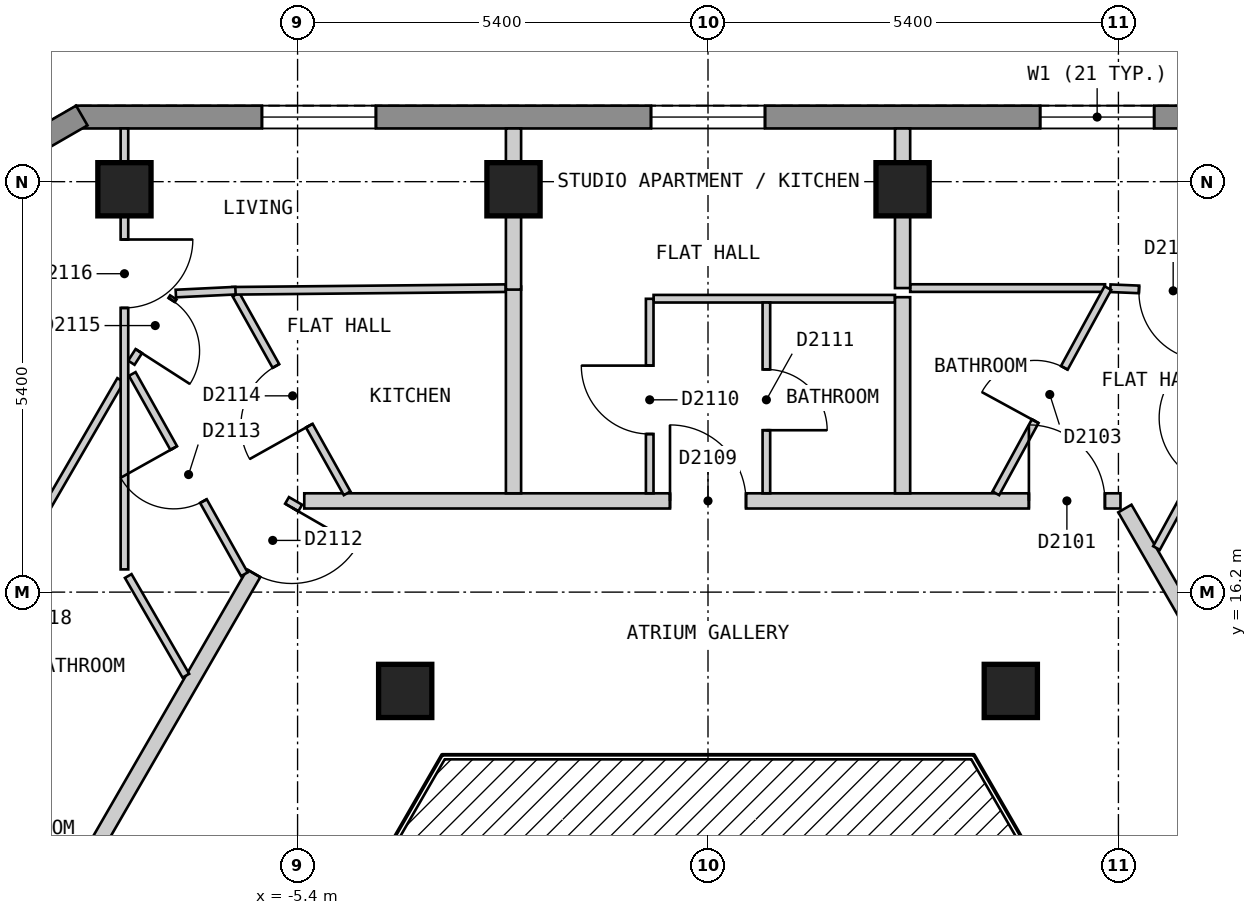
"""IFC4 building model, lengths in metres.
Left out: names, types, materials, properties, quantities, classifications, styles, units other than length and angle.
Written with IfcOpenShell. Run it as: python <this file> out.ifc"""

import sys

from ifc_helpers import new_model, si_unit, direction, frame, frame_2d, origin, origin_2d, place, context, subcontext, project, spatial, polyline, rectangle, outline, extrude, element, fill, save


model = new_model("IFC4")
c1 = context("Model", 3, precision=1e-05, world=origin(), true_north=direction((0.0, 1.0)))
c2 = subcontext(c1, "Body", "Model", "MODEL_VIEW")
j1 = project(units=[si_unit("LENGTHUNIT", "METRE"), si_unit("PLANEANGLEUNIT", "RADIAN")], contexts=[c1])
p1 = place(None, origin())
s1 = spatial("IfcSite", under=j1, at=p1, CompositionType="ELEMENT")
p2 = place(p1, origin())
s2 = spatial("IfcBuilding", under=s1, at=p2, CompositionType="ELEMENT")
p3 = place(p2, frame((0.0, 0.0, 211.8)))
s3 = spatial("IfcBuildingStorey", under=s2, at=p3, CompositionType="ELEMENT", Elevation=211.8)
for number, where, z_axis, x_axis in (
    (1, (2.56, 21.5, 0.0), (0.0, 0.0, 1.0), (-1.0, 0.0, 0.0)),
    (2, (-2.559, 21.5, 0.0), (0.0, 0.0, 1.0), (-1.0, 0.0, 0.0)),
    (3, (-7.678, 21.5, 0.0), (0.0, 0.0, 1.0), (-1.0, 0.0, 0.0)),
    (4, (3.984, 14.9, 0.0), (0.0, 0.0, 1.0), (1.0, 0.0, 0.0)),
    (5, (-3.984, 14.9, 0.0), (0.0, 0.0, 1.0), (1.0, 0.0, 0.0)),
):
    element("IfcColumn", number, at=place(p3, frame(where, z_axis=z_axis, x_axis=x_axis)), inside=s3, PredefinedType="COLUMN", context=c2, shape_type="SweptSolid", body=[
        extrude(rectangle(XDim=0.7, YDim=0.7, at=origin_2d()), origin(), (0.0, 0.0, 1.0), 3.0),
    ])
p4 = place(p3, frame((8.314, 22.45, 0.0), z_axis=(0.0, 0.0, 1.0), x_axis=(-1.0, 0.0, 0.0)))
e6 = element("IfcWall", 6, at=p4, inside=s3, PredefinedType="SOLIDWALL", context=c2, shape_type="SweptSolid", body=[
    extrude(outline(polyline([(0.0, -0.15), (16.628, -0.15), (16.548, 0.15), (0.08, 0.15), (0.0, -0.15)])), origin(), (0.0, 0.0, 1.0), 2.7),
])
p5 = place(p4, frame((2.444, 0.0, 0.15)))
e7 = element("IfcOpeningElement", 7, at=p5, cuts=e6, PredefinedType="OPENING", context=c2, shape_type="SweptSolid", body=[
    extrude(rectangle(XDim=1.5, YDim=2.1, at=frame_2d((0.75, 1.05))), frame((0.0, 0.16, 0.0), z_axis=(0.0, -1.0, 0.0), x_axis=(1.0, 0.0, 0.0)), (0.0, 0.0, 1.0), 0.32),
])
p6 = place(p4, frame((7.564, 0.0, 0.15)))
e8 = element("IfcOpeningElement", 8, at=p6, cuts=e6, PredefinedType="OPENING", context=c2, shape_type="SweptSolid", body=[
    extrude(rectangle(XDim=1.5, YDim=2.1, at=frame_2d((0.75, 1.05))), frame((0.0, 0.16, 0.0), z_axis=(0.0, -1.0, 0.0), x_axis=(1.0, 0.0, 0.0)), (0.0, 0.0, 1.0), 0.32),
])
p7 = place(p4, frame((12.683, 0.0, 0.15)))
e9 = element("IfcOpeningElement", 9, at=p7, cuts=e6, PredefinedType="OPENING", context=c2, shape_type="SweptSolid", body=[
    extrude(rectangle(XDim=1.5, YDim=2.1, at=frame_2d((0.75, 1.05))), frame((0.0, 0.16, 0.0), z_axis=(0.0, -1.0, 0.0), x_axis=(1.0, 0.0, 0.0)), (0.0, 0.0, 1.0), 0.32),
])
p8 = place(p3, frame((-8.239, 22.47, 0.0), z_axis=(0.0, 0.0, 1.0), x_axis=(-0.866022959057, -0.500004234368, 0.0)))
e10 = element("IfcWall", 10, at=p8, inside=s3, PredefinedType="SOLIDWALL", context=c2, shape_type="SweptSolid", body=[
    extrude(outline(polyline([(0.0, -0.15), (5.0, -0.15), (4.92, 0.15), (0.08, 0.15), (0.0, -0.15)])), origin(), (0.0, 0.0, 1.0), 2.7),
])
p9 = place(p8, frame((0.65, 0.0, 0.15)))
e11 = element("IfcOpeningElement", 11, at=p9, cuts=e10, PredefinedType="OPENING", context=c2, shape_type="SweptSolid", body=[
    extrude(rectangle(XDim=1.2, YDim=2.1, at=frame_2d((0.6, 1.05))), frame((0.0, 0.16, 0.0), z_axis=(0.0, -1.0, 0.0), x_axis=(1.0, 0.0, 0.0)), (0.0, 0.0, 1.0), 0.32),
])
p10 = place(p3, frame((5.485, 17.3, 0.0), z_axis=(0.0, 0.0, 1.0), x_axis=(0.499943285704, -0.866058145322, 0.0)))
e12 = element("IfcWall", 12, at=p10, inside=s3, PredefinedType="PARTITIONING", context=c2, shape_type="SweptSolid", body=[
    extrude(rectangle(XDim=10.623, YDim=0.2, at=frame_2d((5.312, 0.0))), origin(), (0.0, 0.0, 1.0), 2.7),
])
p11 = place(p3, frame((-5.312, 17.4, 0.0), z_axis=(0.0, 0.0, 1.0), x_axis=(1.0, 0.0, 0.0)))
e13 = element("IfcWall", 13, at=p11, inside=s3, PredefinedType="PARTITIONING", context=c2, shape_type="SweptSolid", body=[
    extrude(rectangle(XDim=10.739, YDim=0.2, at=frame_2d((5.37, 0.0))), origin(), (0.0, 0.0, 1.0), 2.7),
])
p12 = place(p11, frame((9.534, 0.0, 0.0)))
e14 = element("IfcOpeningElement", 14, at=p12, cuts=e13, PredefinedType="OPENING", context=c2, shape_type="SweptSolid", body=[
    extrude(rectangle(XDim=1.0, YDim=2.1, at=frame_2d((0.5, 1.05))), frame((0.0, 0.11, 0.0), z_axis=(0.0, -1.0, 0.0), x_axis=(1.0, 0.0, 0.0)), (0.0, 0.0, 1.0), 0.22),
])
p13 = place(p11, frame((4.812, 0.0, 0.0)))
e15 = element("IfcOpeningElement", 15, at=p13, cuts=e13, PredefinedType="OPENING", context=c2, shape_type="SweptSolid", body=[
    extrude(rectangle(XDim=1.0, YDim=2.1, at=frame_2d((0.5, 1.05))), frame((0.0, 0.11, 0.0), z_axis=(0.0, -1.0, 0.0), x_axis=(1.0, 0.0, 0.0)), (0.0, 0.0, 1.0), 0.22),
])
p14 = place(p3, frame((-10.854, 8.0, 0.0), z_axis=(0.0, 0.0, 1.0), x_axis=(0.499997637144, 0.866026767976, 0.0)))
e16 = element("IfcWall", 16, at=p14, inside=s3, PredefinedType="PARTITIONING", context=c2, shape_type="SweptSolid", body=[
    extrude(rectangle(XDim=10.854, YDim=0.2, at=frame_2d((5.427, 0.0))), origin(), (0.0, 0.0, 1.0), 2.7),
])
p15 = place(p14, frame((9.754, 0.0, 0.0)))
e17 = element("IfcOpeningElement", 17, at=p15, cuts=e16, PredefinedType="OPENING", context=c2, shape_type="SweptSolid", body=[
    extrude(rectangle(XDim=1.0, YDim=2.1, at=frame_2d((0.5, 1.05))), frame((0.0, 0.11, 0.0), z_axis=(0.0, -1.0, 0.0), x_axis=(1.0, 0.0, 0.0)), (0.0, 0.0, 1.0), 0.22),
])
p16 = place(p3, frame((-7.628, 16.412, 0.0), z_axis=(0.0, 0.0, 1.0), x_axis=(0.500159472144, -0.86593331292, 0.0)))
e18 = element("IfcWall", 18, at=p16, inside=s3, PredefinedType="PARTITIONING", context=c2, shape_type="SweptSolid", body=[
    extrude(rectangle(XDim=1.515, YDim=0.1, at=frame_2d((0.758, 0.0))), origin(), (0.0, 0.0, 1.0), 2.7),
])
p17 = place(p3, frame((-6.211, 20.115, 0.0), z_axis=(0.0, 0.0, 1.0), x_axis=(0.488221234931, -0.872719901092, 0.0)))
e19 = element("IfcWall", 19, at=p17, inside=s3, PredefinedType="PARTITIONING", context=c2, shape_type="SweptSolid", body=[
    extrude(rectangle(XDim=2.996, YDim=0.1, at=frame_2d((1.498, 0.0))), origin(), (0.0, 0.0, 1.0), 2.7),
])
p18 = place(p17, frame((1.077, 0.0, 0.0)))
e20 = element("IfcOpeningElement", 20, at=p18, cuts=e19, PredefinedType="OPENING", context=c2, shape_type="SweptSolid", body=[
    extrude(rectangle(XDim=0.9, YDim=2.1, at=frame_2d((0.45, 1.05))), frame((0.0, 0.06, 0.0), z_axis=(0.0, -1.0, 0.0), x_axis=(1.0, 0.0, 0.0)), (0.0, 0.0, 1.0), 0.12),
])
p19 = place(p3, frame((-7.575, 19.07, 0.0), z_axis=(0.0, 0.0, 1.0), x_axis=(0.488413788688, -0.872612153834, 0.0)))
e21 = element("IfcWall", 21, at=p19, inside=s3, PredefinedType="PARTITIONING", context=c2, shape_type="SweptSolid", body=[
    extrude(rectangle(XDim=3.02, YDim=0.1, at=frame_2d((1.51, 0.0))), origin(), (0.0, 0.0, 1.0), 2.7),
])
p20 = place(p19, frame((1.117, 0.0, 0.0)))
e22 = element("IfcOpeningElement", 22, at=p20, cuts=e21, PredefinedType="OPENING", context=c2, shape_type="SweptSolid", body=[
    extrude(rectangle(XDim=0.8, YDim=2.1, at=frame_2d((0.4, 1.05))), frame((0.0, 0.06, 0.0), z_axis=(0.0, -1.0, 0.0), x_axis=(1.0, 0.0, 0.0)), (0.0, 0.0, 1.0), 0.12),
])
p21 = place(p3, frame((5.294, 20.198, 0.0), z_axis=(0.0, 0.0, 1.0), x_axis=(0.999159599203, -0.040988965834, 0.0)))
e23 = element("IfcWall", 23, at=p21, inside=s3, PredefinedType="PARTITIONING", context=c2, shape_type="SweptSolid", body=[
    extrude(rectangle(XDim=1.709, YDim=0.1, at=frame_2d((0.855, 0.0))), origin(), (0.0, 0.0, 1.0), 2.7),
])
p22 = place(p21, frame((0.377, 0.0, 0.0)))
e24 = element("IfcOpeningElement", 24, at=p22, cuts=e23, PredefinedType="OPENING", context=c2, shape_type="SweptSolid", body=[
    extrude(rectangle(XDim=0.9, YDim=2.1, at=frame_2d((0.45, 1.05))), frame((0.0, 0.06, 0.0), z_axis=(0.0, -1.0, 0.0), x_axis=(1.0, 0.0, 0.0)), (0.0, 0.0, 1.0), 0.12),
])
p23 = place(p3, frame((-0.716, 20.06, 0.0), z_axis=(0.0, 0.0, 1.0), x_axis=(1.0, 0.0, 0.0)))
e25 = element("IfcWall", 25, at=p23, inside=s3, PredefinedType="PARTITIONING", context=c2, shape_type="SweptSolid", body=[
    extrude(rectangle(XDim=3.176, YDim=0.1, at=frame_2d((1.588, 0.0))), origin(), (0.0, 0.0, 1.0), 2.7),
])
p24 = place(p3, frame((2.66, 20.2, 0.0), z_axis=(0.0, 0.0, 1.0), x_axis=(1.0, 0.0, 0.0)))
e26 = element("IfcWall", 26, at=p24, inside=s3, PredefinedType="PARTITIONING", context=c2, shape_type="SweptSolid", body=[
    extrude(rectangle(XDim=2.564, YDim=0.1, at=frame_2d((1.282, 0.0))), origin(), (0.0, 0.0, 1.0), 2.7),
])
p25 = place(p3, frame((-6.259, 20.164, 0.0), z_axis=(0.0, 0.0, 1.0), x_axis=(0.999952982126, 0.009697089139, 0.0)))
e27 = element("IfcWall", 27, at=p25, inside=s3, PredefinedType="PARTITIONING", context=c2, shape_type="SweptSolid", body=[
    extrude(rectangle(XDim=3.6, YDim=0.1, at=frame_2d((1.8, 0.0))), origin(), (0.0, 0.0, 1.0), 2.7),
])
p26 = place(p3, frame((-7.587, 19.218, 0.0), z_axis=(0.0, 0.0, 1.0), x_axis=(0.54066090195, 0.841240624972, 0.0)))
e28 = element("IfcWall", 28, at=p26, inside=s3, PredefinedType="PARTITIONING", context=c2, shape_type="SweptSolid", body=[
    extrude(rectangle(XDim=1.021, YDim=0.1, at=frame_2d((0.51, 0.0))), origin(), (0.0, 0.0, 1.0), 2.7),
])
p27 = place(p26, frame((0.181, 0.0, 0.0)))
e29 = element("IfcOpeningElement", 29, at=p27, cuts=e28, PredefinedType="OPENING", context=c2, shape_type="SweptSolid", body=[
    extrude(rectangle(XDim=0.8, YDim=2.1, at=frame_2d((0.4, 1.05))), frame((0.0, 0.06, 0.0), z_axis=(0.0, -1.0, 0.0), x_axis=(1.0, 0.0, 0.0)), (0.0, 0.0, 1.0), 0.12),
])
p28 = place(p3, frame((-11.392, 12.668, 0.0), z_axis=(0.0, 0.0, 1.0), x_axis=(0.501440551074, 0.865192102217, 0.0)))
e30 = element("IfcWall", 30, at=p28, inside=s3, PredefinedType="PARTITIONING", context=c2, shape_type="SweptSolid", body=[
    extrude(rectangle(XDim=7.307, YDim=0.1, at=frame_2d((3.654, 0.0))), origin(), (0.0, 0.0, 1.0), 2.7),
])
p29 = place(p28, frame((3.278, 0.0, 0.0)))
e31 = element("IfcOpeningElement", 31, at=p29, cuts=e30, PredefinedType="OPENING", context=c2, shape_type="SweptSolid", body=[
    extrude(rectangle(XDim=0.8, YDim=2.1, at=frame_2d((0.4, 1.05))), frame((0.0, 0.06, 0.0), z_axis=(0.0, -1.0, 0.0), x_axis=(1.0, 0.0, 0.0)), (0.0, 0.0, 1.0), 0.12),
])
p30 = place(p3, frame((3.787, 17.5, 0.0), z_axis=(0.0, 0.0, 1.0), x_axis=(0.479146828267, 0.877734764585, 0.0)))
e32 = element("IfcWall", 32, at=p30, inside=s3, PredefinedType="PARTITIONING", context=c2, shape_type="SweptSolid", body=[
    extrude(rectangle(XDim=3.076, YDim=0.1, at=frame_2d((1.538, 0.0))), origin(), (0.0, 0.0, 1.0), 2.7),
])
p31 = place(p30, frame((1.081, 0.0, 0.0)))
e33 = element("IfcOpeningElement", 33, at=p31, cuts=e32, PredefinedType="OPENING", context=c2, shape_type="SweptSolid", body=[
    extrude(rectangle(XDim=0.8, YDim=2.1, at=frame_2d((0.4, 1.05))), frame((0.0, 0.06, 0.0), z_axis=(0.0, -1.0, 0.0), x_axis=(1.0, 0.0, 0.0)), (0.0, 0.0, 1.0), 0.12),
])
p32 = place(p3, frame((5.901, 16.78, 0.0), z_axis=(0.0, 0.0, 1.0), x_axis=(0.479148317257, 0.877733951759, 0.0)))
e34 = element("IfcWall", 34, at=p32, inside=s3, PredefinedType="PARTITIONING", context=c2, shape_type="SweptSolid", body=[
    extrude(rectangle(XDim=3.118, YDim=0.1, at=frame_2d((1.559, 0.0))), origin(), (0.0, 0.0, 1.0), 2.7),
])
p33 = place(p32, frame((1.051, 0.0, 0.0)))
e35 = element("IfcOpeningElement", 35, at=p33, cuts=e34, PredefinedType="OPENING", context=c2, shape_type="SweptSolid", body=[
    extrude(rectangle(XDim=0.9, YDim=2.1, at=frame_2d((0.45, 1.05))), frame((0.0, 0.06, 0.0), z_axis=(0.0, -1.0, 0.0), x_axis=(1.0, 0.0, 0.0)), (0.0, 0.0, 1.0), 0.12),
])
p34 = place(p3, frame((0.768, 17.5, 0.0), z_axis=(0.0, 0.0, 1.0), x_axis=(0.0, 1.0, 0.0)))
e36 = element("IfcWall", 36, at=p34, inside=s3, PredefinedType="PARTITIONING", context=c2, shape_type="SweptSolid", body=[
    extrude(rectangle(XDim=2.51, YDim=0.1, at=frame_2d((1.255, 0.0))), origin(), (0.0, 0.0, 1.0), 2.7),
])
p35 = place(p34, frame((0.83, 0.0, 0.0)))
e37 = element("IfcOpeningElement", 37, at=p35, cuts=e36, PredefinedType="OPENING", context=c2, shape_type="SweptSolid", body=[
    extrude(rectangle(XDim=0.8, YDim=2.1, at=frame_2d((0.4, 1.05))), frame((0.0, 0.06, 0.0), z_axis=(0.0, -1.0, 0.0), x_axis=(1.0, 0.0, 0.0)), (0.0, 0.0, 1.0), 0.12),
])
p36 = place(p3, frame((-7.678, 16.499, 0.0), z_axis=(0.0, 0.0, 1.0), x_axis=(0.0, 1.0, 0.0)))
e38 = element("IfcWall", 38, at=p36, inside=s3, PredefinedType="PARTITIONING", context=c2, shape_type="SweptSolid", body=[
    extrude(rectangle(XDim=5.801, YDim=0.1, at=frame_2d((2.9, 0.0))), origin(), (0.0, 0.0, 1.0), 2.7),
])
p37 = place(p36, frame((3.44, 0.0, 0.0)))
e39 = element("IfcOpeningElement", 39, at=p37, cuts=e38, PredefinedType="OPENING", context=c2, shape_type="SweptSolid", body=[
    extrude(rectangle(XDim=0.9, YDim=2.1, at=frame_2d((0.45, 1.05))), frame((0.0, 0.06, 0.0), z_axis=(0.0, -1.0, 0.0), x_axis=(1.0, 0.0, 0.0)), (0.0, 0.0, 1.0), 0.12),
])
p38 = place(p3, frame((-0.767, 17.5, 0.0), z_axis=(0.0, 0.0, 1.0), x_axis=(0.0, 1.0, 0.0)))
e40 = element("IfcWall", 40, at=p38, inside=s3, PredefinedType="PARTITIONING", context=c2, shape_type="SweptSolid", body=[
    extrude(rectangle(XDim=2.559, YDim=0.1, at=frame_2d((1.28, 0.0))), origin(), (0.0, 0.0, 1.0), 2.7),
])
p39 = place(p38, frame((0.78, 0.0, 0.0)))
e41 = element("IfcOpeningElement", 41, at=p39, cuts=e40, PredefinedType="OPENING", context=c2, shape_type="SweptSolid", body=[
    extrude(rectangle(XDim=0.9, YDim=2.1, at=frame_2d((0.45, 1.05))), frame((0.0, 0.06, 0.0), z_axis=(0.0, -1.0, 0.0), x_axis=(1.0, 0.0, 0.0)), (0.0, 0.0, 1.0), 0.12),
])
p40 = place(p3, frame((-7.002, 20.128, 0.0), z_axis=(0.0, 0.0, 1.0), x_axis=(0.998824855741, 0.048465529548, 0.0)))
e42 = element("IfcWall", 42, at=p40, inside=s3, PredefinedType="PARTITIONING", context=c2, shape_type="SweptSolid", body=[
    extrude(rectangle(XDim=0.786, YDim=0.1, at=frame_2d((0.393, 0.0))), origin(), (0.0, 0.0, 1.0), 2.7),
])
p41 = place(p3, frame((-2.559, 20.22, 0.0), z_axis=(0.0, 0.0, 1.0), x_axis=(0.0, -1.0, 0.0)))
e43 = element("IfcWall", 43, at=p41, inside=s3, PredefinedType="PARTITIONING", context=c2, shape_type="SweptSolid", body=[
    extrude(rectangle(XDim=2.72, YDim=0.2, at=frame_2d((1.36, 0.0))), origin(), (0.0, 0.0, 1.0), 2.7),
])
p42 = place(p3, frame((2.56, 20.08, 0.0), z_axis=(0.0, 0.0, 1.0), x_axis=(0.0, -1.0, 0.0)))
e44 = element("IfcWall", 44, at=p42, inside=s3, PredefinedType="PARTITIONING", context=c2, shape_type="SweptSolid", body=[
    extrude(rectangle(XDim=2.58, YDim=0.2, at=frame_2d((1.29, 0.0))), origin(), (0.0, 0.0, 1.0), 2.7),
])
p43 = place(p3, frame((2.56, 20.2, 0.0), z_axis=(0.0, 0.0, 1.0), x_axis=(0.0, 1.0, 0.0)))
e45 = element("IfcWall", 45, at=p43, inside=s3, PredefinedType="PARTITIONING", context=c2, shape_type="SweptSolid", body=[
    extrude(rectangle(XDim=2.1, YDim=0.2, at=frame_2d((1.05, 0.0))), origin(), (0.0, 0.0, 1.0), 2.7),
])
p44 = place(p3, frame((-2.559, 20.18, 0.0), z_axis=(0.0, 0.0, 1.0), x_axis=(0.0, 1.0, 0.0)))
e46 = element("IfcWall", 46, at=p44, inside=s3, PredefinedType="PARTITIONING", context=c2, shape_type="SweptSolid", body=[
    extrude(rectangle(XDim=2.12, YDim=0.2, at=frame_2d((1.06, 0.0))), origin(), (0.0, 0.0, 1.0), 2.7),
])
p45 = place(p5, origin())
e47 = element("IfcWindow", 47, at=p45, inside=s3, PartitioningType="SINGLE_PANEL", PredefinedType="WINDOW", context=c2, shape_type="SweptSolid", body=[
    extrude(rectangle(XDim=1.5, YDim=2.1, at=frame_2d((0.75, 1.05))), frame((0.0, 0.03, 0.0), z_axis=(0.0, -1.0, 0.0), x_axis=(1.0, 0.0, 0.0)), (0.0, 0.0, 1.0), 0.06),
])
fill(e7, e47)
p46 = place(p6, origin())
e48 = element("IfcWindow", 48, at=p46, inside=s3, PartitioningType="SINGLE_PANEL", PredefinedType="WINDOW", context=c2, shape_type="SweptSolid", body=[
    extrude(rectangle(XDim=1.5, YDim=2.1, at=frame_2d((0.75, 1.05))), frame((0.0, 0.03, 0.0), z_axis=(0.0, -1.0, 0.0), x_axis=(1.0, 0.0, 0.0)), (0.0, 0.0, 1.0), 0.06),
])
fill(e8, e48)
p47 = place(p7, origin())
e49 = element("IfcWindow", 49, at=p47, inside=s3, PartitioningType="SINGLE_PANEL", PredefinedType="WINDOW", context=c2, shape_type="SweptSolid", body=[
    extrude(rectangle(XDim=1.5, YDim=2.1, at=frame_2d((0.75, 1.05))), frame((0.0, 0.03, 0.0), z_axis=(0.0, -1.0, 0.0), x_axis=(1.0, 0.0, 0.0)), (0.0, 0.0, 1.0), 0.06),
])
fill(e9, e49)
p48 = place(p12, origin())
e50 = element("IfcDoor", 50, at=p48, inside=s3, OperationType="SINGLE_SWING_LEFT", PredefinedType="DOOR", context=c2, shape_type="SweptSolid", body=[
    extrude(rectangle(XDim=1.0, YDim=2.1, at=frame_2d((0.5, 1.05))), frame((0.0, 0.025, 0.0), z_axis=(0.0, -1.0, 0.0), x_axis=(1.0, 0.0, 0.0)), (0.0, 0.0, 1.0), 0.05),
])
fill(e14, e50)
p49 = place(p31, origin())
e51 = element("IfcDoor", 51, at=p49, inside=s3, OperationType="SINGLE_SWING_LEFT", PredefinedType="DOOR", context=c2, shape_type="SweptSolid", body=[
    extrude(rectangle(XDim=0.8, YDim=2.1, at=frame_2d((0.4, 1.05))), frame((0.0, 0.025, 0.0), z_axis=(0.0, -1.0, 0.0), x_axis=(1.0, 0.0, 0.0)), (0.0, 0.0, 1.0), 0.05),
])
fill(e33, e51)
p50 = place(p22, origin())
e52 = element("IfcDoor", 52, at=p50, inside=s3, OperationType="SINGLE_SWING_RIGHT", PredefinedType="DOOR", context=c2, shape_type="SweptSolid", body=[
    extrude(rectangle(XDim=0.9, YDim=2.1, at=frame_2d((0.45, 1.05))), frame((0.0, 0.025, 0.0), z_axis=(0.0, -1.0, 0.0), x_axis=(1.0, 0.0, 0.0)), (0.0, 0.0, 1.0), 0.05),
])
fill(e24, e52)
p51 = place(p13, origin())
e53 = element("IfcDoor", 53, at=p51, inside=s3, OperationType="SINGLE_SWING_LEFT", PredefinedType="DOOR", context=c2, shape_type="SweptSolid", body=[
    extrude(rectangle(XDim=1.0, YDim=2.1, at=frame_2d((0.5, 1.05))), frame((0.0, 0.025, 0.0), z_axis=(0.0, -1.0, 0.0), x_axis=(1.0, 0.0, 0.0)), (0.0, 0.0, 1.0), 0.05),
])
fill(e15, e53)
p52 = place(p39, origin())
e54 = element("IfcDoor", 54, at=p52, inside=s3, OperationType="SINGLE_SWING_RIGHT", PredefinedType="DOOR", context=c2, shape_type="SweptSolid", body=[
    extrude(rectangle(XDim=0.9, YDim=2.1, at=frame_2d((0.45, 1.05))), frame((0.0, 0.025, 0.0), z_axis=(0.0, -1.0, 0.0), x_axis=(1.0, 0.0, 0.0)), (0.0, 0.0, 1.0), 0.05),
])
fill(e41, e54)
p53 = place(p35, origin())
e55 = element("IfcDoor", 55, at=p53, inside=s3, OperationType="SINGLE_SWING_LEFT", PredefinedType="DOOR", context=c2, shape_type="SweptSolid", body=[
    extrude(rectangle(XDim=0.8, YDim=2.1, at=frame_2d((0.4, 1.05))), frame((0.0, 0.025, 0.0), z_axis=(0.0, -1.0, 0.0), x_axis=(1.0, 0.0, 0.0)), (0.0, 0.0, 1.0), 0.05),
])
fill(e37, e55)
p54 = place(p15, origin())
e56 = element("IfcDoor", 56, at=p54, inside=s3, OperationType="SINGLE_SWING_RIGHT", PredefinedType="DOOR", context=c2, shape_type="SweptSolid", body=[
    extrude(rectangle(XDim=1.0, YDim=2.1, at=frame_2d((0.5, 1.05))), frame((0.0, 0.025, 0.0), z_axis=(0.0, -1.0, 0.0), x_axis=(1.0, 0.0, 0.0)), (0.0, 0.0, 1.0), 0.05),
])
fill(e17, e56)
p55 = place(p20, origin())
e57 = element("IfcDoor", 57, at=p55, inside=s3, OperationType="SINGLE_SWING_LEFT", PredefinedType="DOOR", context=c2, shape_type="SweptSolid", body=[
    extrude(rectangle(XDim=0.8, YDim=2.1, at=frame_2d((0.4, 1.05))), frame((0.0, 0.025, 0.0), z_axis=(0.0, -1.0, 0.0), x_axis=(1.0, 0.0, 0.0)), (0.0, 0.0, 1.0), 0.05),
])
fill(e22, e57)
p56 = place(p18, origin())
e58 = element("IfcDoor", 58, at=p56, inside=s3, OperationType="SINGLE_SWING_RIGHT", PredefinedType="DOOR", context=c2, shape_type="SweptSolid", body=[
    extrude(rectangle(XDim=0.9, YDim=2.1, at=frame_2d((0.45, 1.05))), frame((0.0, 0.025, 0.0), z_axis=(0.0, -1.0, 0.0), x_axis=(1.0, 0.0, 0.0)), (0.0, 0.0, 1.0), 0.05),
])
fill(e20, e58)
p57 = place(p27, origin())
e59 = element("IfcDoor", 59, at=p57, inside=s3, OperationType="SINGLE_SWING_LEFT", PredefinedType="DOOR", context=c2, shape_type="SweptSolid", body=[
    extrude(rectangle(XDim=0.8, YDim=2.1, at=frame_2d((0.4, 1.05))), frame((0.0, 0.025, 0.0), z_axis=(0.0, -1.0, 0.0), x_axis=(1.0, 0.0, 0.0)), (0.0, 0.0, 1.0), 0.05),
])
fill(e29, e59)
p58 = place(p37, origin())
e60 = element("IfcDoor", 60, at=p58, inside=s3, OperationType="SINGLE_SWING_RIGHT", PredefinedType="DOOR", context=c2, shape_type="SweptSolid", body=[
    extrude(rectangle(XDim=0.9, YDim=2.1, at=frame_2d((0.45, 1.05))), frame((0.0, 0.025, 0.0), z_axis=(0.0, -1.0, 0.0), x_axis=(1.0, 0.0, 0.0)), (0.0, 0.0, 1.0), 0.05),
])
fill(e39, e60)
save(model, sys.argv[1])
